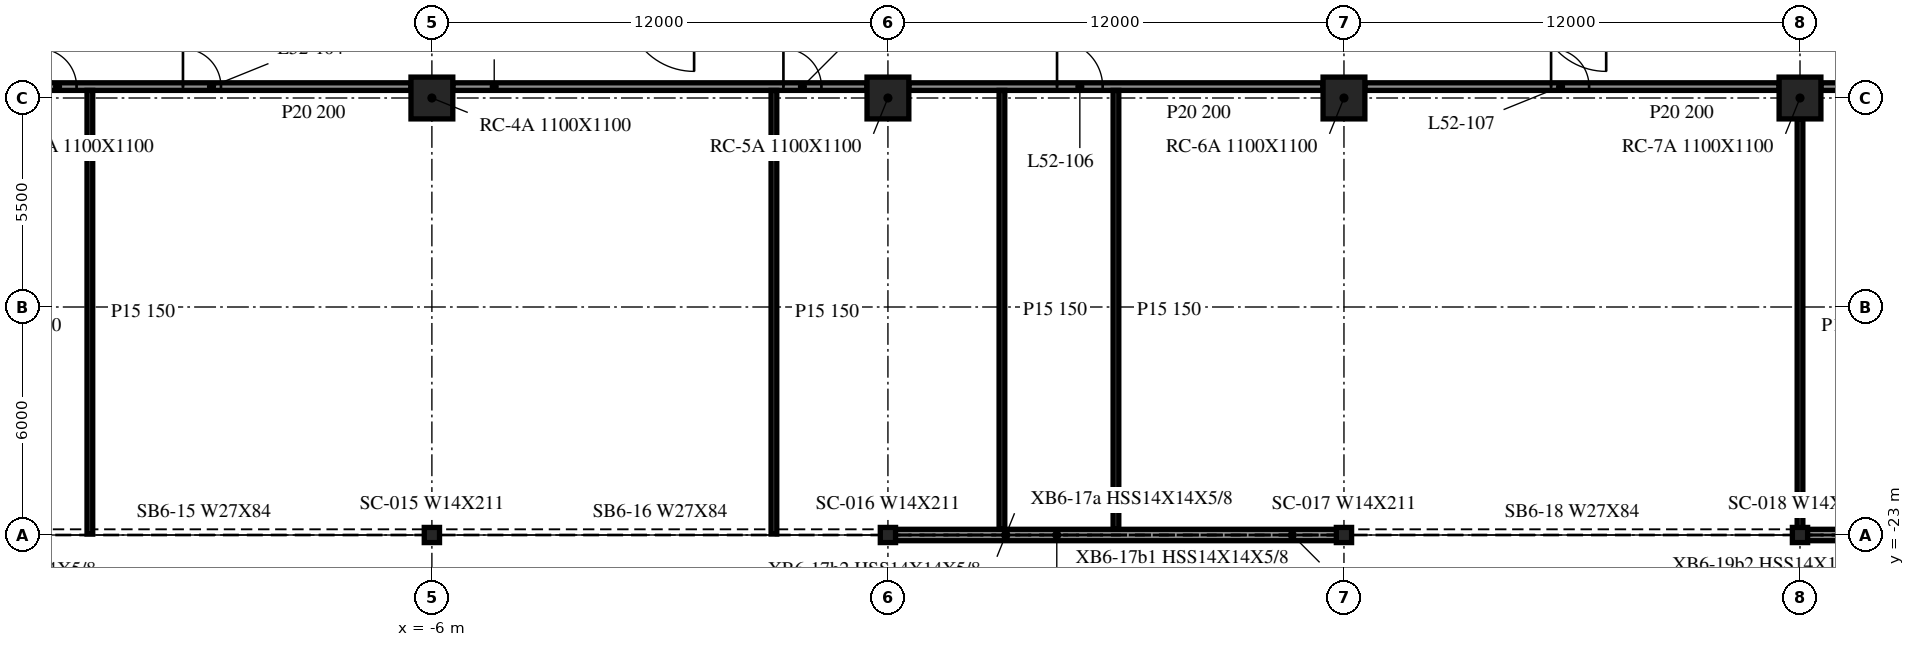
"""IFC4 building model, lengths in metres.
Left out: names, types, materials, properties, quantities, classifications, styles, units other than length and angle.
Written with IfcOpenShell. Run it as: python <this file> out.ifc"""

import sys

from ifc_helpers import new_model, si_unit, direction, frame, frame_2d, origin, origin_2d, place, context, subcontext, project, spatial, rectangle, i_section, extrude, element, fill, save


model = new_model("IFC4")
c1 = context("Model", 3, precision=1e-05, world=origin(), true_north=direction((0.0, 1.0)))
c2 = subcontext(c1, "Body", "Model", "MODEL_VIEW")
j1 = project(units=[si_unit("LENGTHUNIT", "METRE"), si_unit("PLANEANGLEUNIT", "RADIAN")], contexts=[c1])
p1 = place(None, origin())
s1 = spatial("IfcSite", under=j1, at=p1, CompositionType="ELEMENT")
p2 = place(p1, origin())
s2 = spatial("IfcBuilding", under=s1, at=p2, CompositionType="ELEMENT")
p3 = place(p2, frame((0.0, 0.0, 216.7)))
s3 = spatial("IfcBuildingStorey", under=s2, at=p3, CompositionType="ELEMENT", Elevation=216.7)
for number, where, z_axis, x_axis in (
    (1, (-6.0, -11.5, -0.34), (0.0, 0.0, 1.0), (1.0, 0.0, 0.0)),
    (2, (6.0, -11.5, -0.34), (0.0, 0.0, 1.0), (1.0, 0.0, 0.0)),
    (3, (18.0, -11.5, -0.34), (0.0, 0.0, 1.0), (1.0, 0.0, 0.0)),
    (4, (30.0, -11.5, -0.34), (0.0, 0.0, 1.0), (1.0, 0.0, 0.0)),
):
    element("IfcColumn", number, at=place(p3, frame(where, z_axis=z_axis, x_axis=x_axis)), inside=s3, PredefinedType="COLUMN", context=c2, shape_type="SweptSolid", body=[
        extrude(rectangle(XDim=1.1, YDim=1.1, at=origin_2d()), origin(), (0.0, 0.0, 1.0), 3.8),
    ])
for number, where, z_axis, x_axis in (
    (5, (-6.0, -23.0, -0.34), (0.0, 0.0, 1.0), (1.0, 0.0, 0.0)),
    (6, (6.0, -23.0, -0.34), (0.0, 0.0, 1.0), (1.0, 0.0, 0.0)),
    (7, (18.0, -23.0, -0.34), (0.0, 0.0, 1.0), (1.0, 0.0, 0.0)),
    (8, (30.0, -23.0, -0.34), (0.0, 0.0, 1.0), (1.0, 0.0, 0.0)),
):
    element("IfcColumn", number, at=place(p3, frame(where, z_axis=z_axis, x_axis=x_axis)), inside=s3, PredefinedType="COLUMN", context=c2, shape_type="SweptSolid", body=[
        extrude(i_section(OverallWidth=0.401, OverallDepth=0.399, WebThickness=0.025, FlangeThickness=0.04, at=origin_2d()), origin(), (0.0, 0.0, 1.0), 3.8),
    ])
for number, where, z_axis, x_axis in (
    (9, (6.012, -23.0, 0.0), (0.0, 0.0, 1.0), (1.0, 0.0, 0.0)),
    (10, (30.012, -23.0, 0.0), (0.0, 0.0, 1.0), (1.0, 0.0, 0.0)),
):
    element("IfcWall", number, at=place(p3, frame(where, z_axis=z_axis, x_axis=x_axis)), inside=s3, PredefinedType="NOTDEFINED", context=c2, shape_type="SweptSolid", body=[
        extrude(rectangle(XDim=11.975, YDim=0.3, at=frame_2d((5.988, 0.0))), origin(), (0.0, 0.0, 1.0), 2.782),
    ])
p4 = place(p3, frame((-17.45, -11.2, 0.0), z_axis=(0.0, 0.0, 1.0), x_axis=(1.0, 0.0, 0.0)))
e11 = element("IfcWall", 11, at=p4, inside=s3, PredefinedType="PARTITIONING", context=c2, shape_type="SweptSolid", body=[
    extrude(rectangle(XDim=10.9, YDim=0.2, at=frame_2d((5.45, 0.0))), origin(), (0.0, 0.0, 1.0), 3.46),
])
p5 = place(p4, frame((1.1, 0.0, 0.0)))
e12 = element("IfcOpeningElement", 12, at=p5, cuts=e11, PredefinedType="OPENING", context=c2, shape_type="SweptSolid", body=[
    extrude(rectangle(XDim=1.0, YDim=2.1, at=frame_2d((0.5, 1.05))), frame((0.0, 0.11, 0.0), z_axis=(0.0, -1.0, 0.0), x_axis=(1.0, 0.0, 0.0)), (0.0, 0.0, 1.0), 0.22),
])
p6 = place(p4, frame((4.9, 0.0, 0.0)))
e13 = element("IfcOpeningElement", 13, at=p6, cuts=e11, PredefinedType="OPENING", context=c2, shape_type="SweptSolid", body=[
    extrude(rectangle(XDim=1.0, YDim=2.1, at=frame_2d((0.5, 1.05))), frame((0.0, 0.11, 0.0), z_axis=(0.0, -1.0, 0.0), x_axis=(1.0, 0.0, 0.0)), (0.0, 0.0, 1.0), 0.22),
])
p7 = place(p3, frame((-5.45, -11.2, 0.0), z_axis=(0.0, 0.0, 1.0), x_axis=(1.0, 0.0, 0.0)))
e14 = element("IfcWall", 14, at=p7, inside=s3, PredefinedType="PARTITIONING", context=c2, shape_type="SweptSolid", body=[
    extrude(rectangle(XDim=10.9, YDim=0.2, at=frame_2d((5.45, 0.0))), origin(), (0.0, 0.0, 1.0), 3.46),
])
p8 = place(p7, frame((8.7, 0.0, 0.0)))
e15 = element("IfcOpeningElement", 15, at=p8, cuts=e14, PredefinedType="OPENING", context=c2, shape_type="SweptSolid", body=[
    extrude(rectangle(XDim=1.0, YDim=2.1, at=frame_2d((0.5, 1.05))), frame((0.0, 0.11, 0.0), z_axis=(0.0, -1.0, 0.0), x_axis=(1.0, 0.0, 0.0)), (0.0, 0.0, 1.0), 0.22),
])
p9 = place(p3, frame((6.55, -11.2, 0.0), z_axis=(0.0, 0.0, 1.0), x_axis=(1.0, 0.0, 0.0)))
e16 = element("IfcWall", 16, at=p9, inside=s3, PredefinedType="PARTITIONING", context=c2, shape_type="SweptSolid", body=[
    extrude(rectangle(XDim=10.9, YDim=0.2, at=frame_2d((5.45, 0.0))), origin(), (0.0, 0.0, 1.0), 3.46),
])
p10 = place(p9, frame((3.9, 0.0, 0.0)))
e17 = element("IfcOpeningElement", 17, at=p10, cuts=e16, PredefinedType="OPENING", context=c2, shape_type="SweptSolid", body=[
    extrude(rectangle(XDim=1.2, YDim=2.1, at=frame_2d((0.6, 1.05))), frame((0.0, 0.11, 0.0), z_axis=(0.0, -1.0, 0.0), x_axis=(1.0, 0.0, 0.0)), (0.0, 0.0, 1.0), 0.22),
])
p11 = place(p3, frame((18.55, -11.2, 0.0), z_axis=(0.0, 0.0, 1.0), x_axis=(1.0, 0.0, 0.0)))
e18 = element("IfcWall", 18, at=p11, inside=s3, PredefinedType="PARTITIONING", context=c2, shape_type="SweptSolid", body=[
    extrude(rectangle(XDim=10.9, YDim=0.2, at=frame_2d((5.45, 0.0))), origin(), (0.0, 0.0, 1.0), 3.46),
])
p12 = place(p11, frame((4.9, 0.0, 0.0)))
e19 = element("IfcOpeningElement", 19, at=p12, cuts=e18, PredefinedType="OPENING", context=c2, shape_type="SweptSolid", body=[
    extrude(rectangle(XDim=1.0, YDim=2.1, at=frame_2d((0.5, 1.05))), frame((0.0, 0.11, 0.0), z_axis=(0.0, -1.0, 0.0), x_axis=(1.0, 0.0, 0.0)), (0.0, 0.0, 1.0), 0.22),
])
p13 = place(p3, frame((30.55, -11.2, 0.0), z_axis=(0.0, 0.0, 1.0), x_axis=(1.0, 0.0, 0.0)))
e20 = element("IfcWall", 20, at=p13, inside=s3, PredefinedType="PARTITIONING", context=c2, shape_type="SweptSolid", body=[
    extrude(rectangle(XDim=10.9, YDim=0.2, at=frame_2d((5.45, 0.0))), origin(), (0.0, 0.0, 1.0), 3.46),
])
p14 = place(p13, frame((3.9, 0.0, 0.0)))
e21 = element("IfcOpeningElement", 21, at=p14, cuts=e20, PredefinedType="OPENING", context=c2, shape_type="SweptSolid", body=[
    extrude(rectangle(XDim=1.2, YDim=2.1, at=frame_2d((0.6, 1.05))), frame((0.0, 0.11, 0.0), z_axis=(0.0, -1.0, 0.0), x_axis=(1.0, 0.0, 0.0)), (0.0, 0.0, 1.0), 0.22),
])
p15 = place(p13, frame((5.7, 0.0, 0.0)))
e22 = element("IfcOpeningElement", 22, at=p15, cuts=e20, PredefinedType="OPENING", context=c2, shape_type="SweptSolid", body=[
    extrude(rectangle(XDim=1.0, YDim=2.1, at=frame_2d((0.5, 1.05))), frame((0.0, 0.11, 0.0), z_axis=(0.0, -1.0, 0.0), x_axis=(1.0, 0.0, 0.0)), (0.0, 0.0, 1.0), 0.22),
])
for number, where, z_axis, x_axis in (
    (23, (-15.0, -22.975, 0.0), (0.0, 0.0, 1.0), (0.0, 1.0, 0.0)),
    (24, (3.0, -22.975, 0.0), (0.0, 0.0, 1.0), (0.0, 1.0, 0.0)),
):
    element("IfcWall", number, at=place(p3, frame(where, z_axis=z_axis, x_axis=x_axis)), inside=s3, PredefinedType="PARTITIONING", context=c2, shape_type="SweptSolid", body=[
        extrude(rectangle(XDim=11.675, YDim=0.15, at=frame_2d((5.837, 0.0))), origin(), (0.0, 0.0, 1.0), 3.46),
    ])
for number, where, z_axis, x_axis in (
    (25, (9.0, -22.85, 0.0), (0.0, 0.0, 1.0), (0.0, 1.0, 0.0)),
    (26, (12.0, -22.85, 0.0), (0.0, 0.0, 1.0), (0.0, 1.0, 0.0)),
):
    element("IfcWall", number, at=place(p3, frame(where, z_axis=z_axis, x_axis=x_axis)), inside=s3, PredefinedType="PARTITIONING", context=c2, shape_type="SweptSolid", body=[
        extrude(rectangle(XDim=11.55, YDim=0.15, at=frame_2d((5.775, 0.0))), origin(), (0.0, 0.0, 1.0), 3.46),
    ])
p16 = place(p3, frame((30.0, -22.975, 0.0), z_axis=(0.0, 0.0, 1.0), x_axis=(0.0, 1.0, 0.0)))
e27 = element("IfcWall", 27, at=p16, inside=s3, PredefinedType="PARTITIONING", context=c2, shape_type="SweptSolid", body=[
    extrude(rectangle(XDim=10.925, YDim=0.15, at=frame_2d((5.462, 0.0))), origin(), (0.0, 0.0, 1.0), 3.46),
])
p17 = place(p5, origin())
e28 = element("IfcDoor", 28, at=p17, inside=s3, OperationType="SINGLE_SWING_RIGHT", PredefinedType="DOOR", context=c2, shape_type="SweptSolid", body=[
    extrude(rectangle(XDim=1.0, YDim=2.1, at=frame_2d((0.5, 1.05))), frame((0.0, 0.025, 0.0), z_axis=(0.0, -1.0, 0.0), x_axis=(1.0, 0.0, 0.0)), (0.0, 0.0, 1.0), 0.05),
])
fill(e12, e28)
p18 = place(p6, origin())
e29 = element("IfcDoor", 29, at=p18, inside=s3, OperationType="SINGLE_SWING_RIGHT", PredefinedType="DOOR", context=c2, shape_type="SweptSolid", body=[
    extrude(rectangle(XDim=1.0, YDim=2.1, at=frame_2d((0.5, 1.05))), frame((0.0, 0.025, 0.0), z_axis=(0.0, -1.0, 0.0), x_axis=(1.0, 0.0, 0.0)), (0.0, 0.0, 1.0), 0.05),
])
fill(e13, e29)
p19 = place(p8, origin())
e30 = element("IfcDoor", 30, at=p19, inside=s3, OperationType="SINGLE_SWING_LEFT", PredefinedType="DOOR", context=c2, shape_type="SweptSolid", body=[
    extrude(rectangle(XDim=1.0, YDim=2.1, at=frame_2d((0.5, 1.05))), frame((0.0, 0.025, 0.0), z_axis=(0.0, -1.0, 0.0), x_axis=(1.0, 0.0, 0.0)), (0.0, 0.0, 1.0), 0.05),
])
fill(e15, e30)
p20 = place(p10, origin())
e31 = element("IfcDoor", 31, at=p20, inside=s3, OperationType="SINGLE_SWING_RIGHT", PredefinedType="DOOR", context=c2, shape_type="SweptSolid", body=[
    extrude(rectangle(XDim=1.2, YDim=2.1, at=frame_2d((0.6, 1.05))), frame((0.0, 0.025, 0.0), z_axis=(0.0, -1.0, 0.0), x_axis=(1.0, 0.0, 0.0)), (0.0, 0.0, 1.0), 0.05),
])
fill(e17, e31)
p21 = place(p12, origin())
e32 = element("IfcDoor", 32, at=p21, inside=s3, OperationType="SINGLE_SWING_RIGHT", PredefinedType="DOOR", context=c2, shape_type="SweptSolid", body=[
    extrude(rectangle(XDim=1.0, YDim=2.1, at=frame_2d((0.5, 1.05))), frame((0.0, 0.025, 0.0), z_axis=(0.0, -1.0, 0.0), x_axis=(1.0, 0.0, 0.0)), (0.0, 0.0, 1.0), 0.05),
])
fill(e19, e32)
save(model, sys.argv[1])
